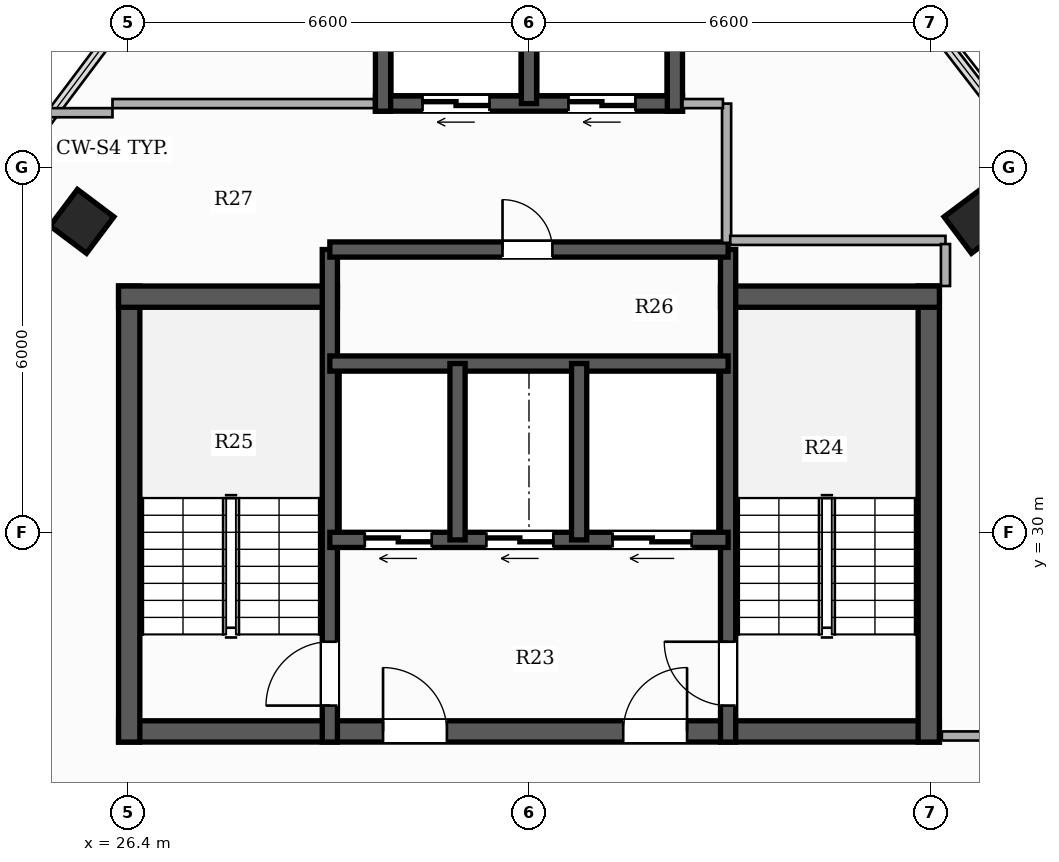
"""IFC4 building model, lengths in metres.
Left out: names, types, materials, properties, quantities, classifications, styles, units other than length and angle.
Written with IfcOpenShell. Run it as: python <this file> out.ifc"""

import sys

from ifc_helpers import new_model, si_unit, direction, frame, frame_2d, origin, origin_2d, place, context, subcontext, project, spatial, rectangle, hollow_rectangle, extrude, element, fill, save


model = new_model("IFC4")
c1 = context("Model", 3, precision=1e-05, world=origin(), true_north=direction((0.0, 1.0)))
c2 = subcontext(c1, "Body", "Model", "MODEL_VIEW")
j1 = project(units=[si_unit("LENGTHUNIT", "METRE"), si_unit("PLANEANGLEUNIT", "RADIAN")], contexts=[c1])
p1 = place(None, origin())
s1 = spatial("IfcSite", under=j1, at=p1, CompositionType="ELEMENT")
p2 = place(p1, origin())
s2 = spatial("IfcBuilding", under=s1, at=p2, CompositionType="ELEMENT")
p3 = place(p2, frame((0.0, 0.0, 250.25)))
s3 = spatial("IfcBuildingStorey", under=s2, at=p3, CompositionType="ELEMENT", Elevation=250.25)
p4 = place(p3, frame((26.25, 26.725, 0.0), z_axis=(0.0, 0.0, 1.0), x_axis=(1.0, 0.0, 0.0)))
e1 = element("IfcWall", 1, at=p4, inside=s3, PredefinedType="SHEAR", context=c2, shape_type="SweptSolid", body=[
    extrude(rectangle(XDim=13.5, YDim=0.35, at=frame_2d((6.75, 0.0))), origin(), (0.0, 0.0, 1.0), 3.3),
])
p5 = place(p4, frame((4.35, 0.0, 0.0)))
e2 = element("IfcOpeningElement", 2, at=p5, cuts=e1, PredefinedType="OPENING", context=c2, shape_type="SweptSolid", body=[
    extrude(rectangle(XDim=1.05, YDim=2.15, at=frame_2d((0.525, 1.075))), frame((0.0, 0.185, 0.0), z_axis=(0.0, -1.0, 0.0), x_axis=(1.0, 0.0, 0.0)), (0.0, 0.0, 1.0), 0.37),
])
p6 = place(p4, frame((8.3, 0.0, 0.0)))
e3 = element("IfcOpeningElement", 3, at=p6, cuts=e1, PredefinedType="OPENING", context=c2, shape_type="SweptSolid", body=[
    extrude(rectangle(XDim=1.05, YDim=2.15, at=frame_2d((0.525, 1.075))), frame((0.0, 0.185, 0.0), z_axis=(0.0, -1.0, 0.0), x_axis=(1.0, 0.0, 0.0)), (0.0, 0.0, 1.0), 0.37),
])
p7 = place(p3, frame((26.425, 26.55, 0.0), z_axis=(0.0, 0.0, 1.0), x_axis=(0.0, 1.0, 0.0)))
e4 = element("IfcWall", 4, at=p7, inside=s3, PredefinedType="SHEAR", context=c2, shape_type="SweptSolid", body=[
    extrude(rectangle(XDim=7.5, YDim=0.35, at=frame_2d((3.75, 0.0))), origin(), (0.0, 0.0, 1.0), 3.3),
])
p8 = place(p3, frame((26.25, 33.875, 0.0), z_axis=(0.0, 0.0, 1.0), x_axis=(1.0, 0.0, 0.0)))
e5 = element("IfcWall", 5, at=p8, inside=s3, PredefinedType="SHEAR", context=c2, shape_type="SweptSolid", body=[
    extrude(rectangle(XDim=3.6, YDim=0.35, at=frame_2d((1.8, 0.0))), origin(), (0.0, 0.0, 1.0), 3.3),
])
p9 = place(p3, frame((39.575, 26.55, 0.0), z_axis=(0.0, 0.0, 1.0), x_axis=(0.0, 1.0, 0.0)))
e6 = element("IfcWall", 6, at=p9, inside=s3, PredefinedType="SHEAR", context=c2, shape_type="SweptSolid", body=[
    extrude(rectangle(XDim=7.5, YDim=0.35, at=frame_2d((3.75, 0.0))), origin(), (0.0, 0.0, 1.0), 3.3),
])
p10 = place(p3, frame((36.15, 33.875, 0.0), z_axis=(0.0, 0.0, 1.0), x_axis=(1.0, 0.0, 0.0)))
e7 = element("IfcWall", 7, at=p10, inside=s3, PredefinedType="SHEAR", context=c2, shape_type="SweptSolid", body=[
    extrude(rectangle(XDim=3.6, YDim=0.35, at=frame_2d((1.8, 0.0))), origin(), (0.0, 0.0, 1.0), 3.3),
])
p11 = place(p3, frame((29.725, 26.55, 0.0), z_axis=(0.0, 0.0, 1.0), x_axis=(0.0, 1.0, 0.0)))
e8 = element("IfcWall", 8, at=p11, inside=s3, PredefinedType="SHEAR", context=c2, shape_type="SweptSolid", body=[
    extrude(rectangle(XDim=8.1, YDim=0.25, at=frame_2d((4.05, 0.0))), origin(), (0.0, 0.0, 1.0), 3.3),
])
p12 = place(p11, frame((0.6, 0.0, 0.0)))
e9 = element("IfcOpeningElement", 9, at=p12, cuts=e8, PredefinedType="OPENING", context=c2, shape_type="SweptSolid", body=[
    extrude(rectangle(XDim=1.05, YDim=2.15, at=frame_2d((0.525, 1.075))), frame((0.0, 0.135, 0.0), z_axis=(0.0, -1.0, 0.0), x_axis=(1.0, 0.0, 0.0)), (0.0, 0.0, 1.0), 0.27),
])
p13 = place(p3, frame((36.275, 26.55, 0.0), z_axis=(0.0, 0.0, 1.0), x_axis=(0.0, 1.0, 0.0)))
e10 = element("IfcWall", 10, at=p13, inside=s3, PredefinedType="SHEAR", context=c2, shape_type="SweptSolid", body=[
    extrude(rectangle(XDim=8.1, YDim=0.25, at=frame_2d((4.05, 0.0))), origin(), (0.0, 0.0, 1.0), 3.3),
])
p14 = place(p13, frame((0.6, 0.0, 0.0)))
e11 = element("IfcOpeningElement", 11, at=p14, cuts=e10, PredefinedType="OPENING", context=c2, shape_type="SweptSolid", body=[
    extrude(rectangle(XDim=1.05, YDim=2.15, at=frame_2d((0.525, 1.075))), frame((0.0, 0.135, 0.0), z_axis=(0.0, -1.0, 0.0), x_axis=(1.0, 0.0, 0.0)), (0.0, 0.0, 1.0), 0.27),
])
p15 = place(p3, frame((36.275, 29.875, 0.0), z_axis=(0.0, 0.0, 1.0), x_axis=(-1.0, 0.0, 0.0)))
e12 = element("IfcWall", 12, at=p15, inside=s3, PredefinedType="SHEAR", context=c2, shape_type="SweptSolid", body=[
    extrude(rectangle(XDim=6.55, YDim=0.25, at=frame_2d((3.275, 0.0))), origin(), (0.0, 0.0, 1.0), 3.3),
])
p16 = place(p15, frame((4.875, 0.0, 0.0)))
e13 = element("IfcOpeningElement", 13, at=p16, cuts=e12, PredefinedType="OPENING", context=c2, shape_type="SweptSolid", body=[
    extrude(rectangle(XDim=1.1, YDim=2.2, at=frame_2d((0.55, 1.1))), frame((0.0, 0.135, 0.0), z_axis=(0.0, -1.0, 0.0), x_axis=(1.0, 0.0, 0.0)), (0.0, 0.0, 1.0), 0.27),
])
p17 = place(p15, frame((2.875, 0.0, 0.0)))
e14 = element("IfcOpeningElement", 14, at=p17, cuts=e12, PredefinedType="OPENING", context=c2, shape_type="SweptSolid", body=[
    extrude(rectangle(XDim=1.1, YDim=2.2, at=frame_2d((0.55, 1.1))), frame((0.0, 0.135, 0.0), z_axis=(0.0, -1.0, 0.0), x_axis=(1.0, 0.0, 0.0)), (0.0, 0.0, 1.0), 0.27),
])
p18 = place(p15, frame((0.6, 0.0, 0.0)))
e15 = element("IfcOpeningElement", 15, at=p18, cuts=e12, PredefinedType="OPENING", context=c2, shape_type="SweptSolid", body=[
    extrude(rectangle(XDim=1.3, YDim=2.2, at=frame_2d((0.65, 1.1))), frame((0.0, 0.135, 0.0), z_axis=(0.0, -1.0, 0.0), x_axis=(1.0, 0.0, 0.0)), (0.0, 0.0, 1.0), 0.27),
])
p19 = place(p3, frame((29.725, 32.775, 0.0), z_axis=(0.0, 0.0, 1.0), x_axis=(1.0, 0.0, 0.0)))
e16 = element("IfcWall", 16, at=p19, inside=s3, PredefinedType="SHEAR", context=c2, shape_type="SweptSolid", body=[
    extrude(rectangle(XDim=6.55, YDim=0.25, at=frame_2d((3.275, 0.0))), origin(), (0.0, 0.0, 1.0), 3.3),
])
for number, where, z_axis, x_axis in (
    (17, (31.825, 29.875, 0.0), (0.0, 0.0, 1.0), (0.0, 1.0, 0.0)),
    (18, (33.825, 29.875, 0.0), (0.0, 0.0, 1.0), (0.0, 1.0, 0.0)),
):
    element("IfcWall", number, at=place(p3, frame(where, z_axis=z_axis, x_axis=x_axis)), inside=s3, PredefinedType="SHEAR", context=c2, shape_type="SweptSolid", body=[
        extrude(rectangle(XDim=2.9, YDim=0.25, at=frame_2d((1.45, 0.0))), origin(), (0.0, 0.0, 1.0), 3.3),
    ])
p20 = place(p3, frame((29.725, 34.65, 0.0), z_axis=(0.0, 0.0, 1.0), x_axis=(1.0, 0.0, 0.0)))
e19 = element("IfcWall", 19, at=p20, inside=s3, PredefinedType="SHEAR", context=c2, shape_type="SweptSolid", body=[
    extrude(rectangle(XDim=6.55, YDim=0.25, at=frame_2d((3.275, 0.0))), origin(), (0.0, 0.0, 1.0), 3.3),
])
p21 = place(p20, frame((2.84, 0.0, 0.0)))
e20 = element("IfcOpeningElement", 20, at=p21, cuts=e19, PredefinedType="OPENING", context=c2, shape_type="SweptSolid", body=[
    extrude(rectangle(XDim=0.82, YDim=2.1, at=frame_2d((0.41, 1.05))), frame((0.0, 0.135, 0.0), z_axis=(0.0, -1.0, 0.0), x_axis=(1.0, 0.0, 0.0)), (0.0, 0.0, 1.0), 0.27),
])
p22 = place(p3, frame((35.525, 37.05, 0.0), z_axis=(0.0, 0.0, 1.0), x_axis=(-1.0, 0.0, 0.0)))
e21 = element("IfcWall", 21, at=p22, inside=s3, PredefinedType="SHEAR", context=c2, shape_type="SweptSolid", body=[
    extrude(rectangle(XDim=5.05, YDim=0.25, at=frame_2d((2.525, 0.0))), origin(), (0.0, 0.0, 1.0), 3.3),
])
p23 = place(p22, frame((3.175, 0.0, 0.0)))
e22 = element("IfcOpeningElement", 22, at=p23, cuts=e21, PredefinedType="OPENING", context=c2, shape_type="SweptSolid", body=[
    extrude(rectangle(XDim=1.1, YDim=2.2, at=frame_2d((0.55, 1.1))), frame((0.0, 0.135, 0.0), z_axis=(0.0, -1.0, 0.0), x_axis=(1.0, 0.0, 0.0)), (0.0, 0.0, 1.0), 0.27),
])
p24 = place(p22, frame((0.775, 0.0, 0.0)))
e23 = element("IfcOpeningElement", 23, at=p24, cuts=e21, PredefinedType="OPENING", context=c2, shape_type="SweptSolid", body=[
    extrude(rectangle(XDim=1.1, YDim=2.2, at=frame_2d((0.55, 1.1))), frame((0.0, 0.135, 0.0), z_axis=(0.0, -1.0, 0.0), x_axis=(1.0, 0.0, 0.0)), (0.0, 0.0, 1.0), 0.27),
])
for number, where, z_axis, x_axis in (
    (24, (30.6, 36.925, 0.0), (0.0, 0.0, 1.0), (0.0, 1.0, 0.0)),
    (25, (35.4, 36.925, 0.0), (0.0, 0.0, 1.0), (0.0, 1.0, 0.0)),
):
    element("IfcWall", number, at=place(p3, frame(where, z_axis=z_axis, x_axis=x_axis)), inside=s3, PredefinedType="SHEAR", context=c2, shape_type="SweptSolid", body=[
        extrude(rectangle(XDim=2.8, YDim=0.25, at=frame_2d((1.4, 0.0))), origin(), (0.0, 0.0, 1.0), 3.3),
    ])
p25 = place(p3, frame((33.0, 37.05, 0.0), z_axis=(0.0, 0.0, 1.0), x_axis=(0.0, 1.0, 0.0)))
e26 = element("IfcWall", 26, at=p25, inside=s3, PredefinedType="SHEAR", context=c2, shape_type="SweptSolid", body=[
    extrude(rectangle(XDim=2.55, YDim=0.25, at=frame_2d((1.275, 0.0))), origin(), (0.0, 0.0, 1.0), 3.3),
])
for number, where, z_axis, x_axis in (
    (27, (25.648, 35.113, 0.0), (0.0, 0.0, 1.0), (0.6, 0.8, 0.0)),
    (28, (40.352, 35.113, 0.0), (0.0, 0.0, 1.0), (-0.6, 0.8, 0.0)),
):
    element("IfcColumn", number, at=place(p3, frame(where, z_axis=z_axis, x_axis=x_axis)), inside=s3, PredefinedType="COLUMN", context=c2, shape_type="SweptSolid", body=[
        extrude(hollow_rectangle(XDim=0.75, YDim=0.75, WallThickness=0.025, at=origin_2d()), origin(), (0.0, 0.0, 1.0), 3.3),
    ])
p26 = place(p3, frame((36.25, 34.76, 0.0), z_axis=(0.0, 0.0, 1.0), x_axis=(0.0, 1.0, 0.0)))
e29 = element("IfcWall", 29, at=p26, inside=s3, PredefinedType="PARTITIONING", context=c2, shape_type="SweptSolid", body=[
    extrude(rectangle(XDim=2.29, YDim=0.15, at=frame_2d((1.145, 0.0))), origin(), (0.0, 0.0, 1.0), 2.425),
])
p27 = place(p3, frame((35.525, 37.05, 0.0), z_axis=(0.0, 0.0, 1.0), x_axis=(1.0, 0.0, 0.0)))
e30 = element("IfcWall", 30, at=p27, inside=s3, PredefinedType="PARTITIONING", context=c2, shape_type="SweptSolid", body=[
    extrude(rectangle(XDim=0.665, YDim=0.15, at=frame_2d((0.333, 0.0))), origin(), (0.0, 0.0, 1.0), 2.425),
])
p28 = place(p3, frame((25.058, 36.9, 0.0), z_axis=(0.0, 0.0, 1.0), x_axis=(1.0, 0.0, 0.0)))
e31 = element("IfcWall", 31, at=p28, inside=s3, PredefinedType="PARTITIONING", context=c2, shape_type="SweptSolid", body=[
    extrude(rectangle(XDim=1.092, YDim=0.15, at=frame_2d((0.546, 0.0))), origin(), (0.0, 0.0, 1.0), 3.06),
])
p29 = place(p3, frame((39.79, 26.65, 0.0), z_axis=(0.0, 0.0, 1.0), x_axis=(1.0, 0.0, 0.0)))
e32 = element("IfcWall", 32, at=p29, inside=s3, PredefinedType="PARTITIONING", context=c2, shape_type="SweptSolid", body=[
    extrude(rectangle(XDim=2.46, YDim=0.15, at=frame_2d((1.23, 0.0))), origin(), (0.0, 0.0, 1.0), 2.565),
])
p30 = place(p3, frame((26.15, 37.05, 0.0), z_axis=(0.0, 0.0, 1.0), x_axis=(1.0, 0.0, 0.0)))
e33 = element("IfcWall", 33, at=p30, inside=s3, PredefinedType="PARTITIONING", context=c2, shape_type="SweptSolid", body=[
    extrude(rectangle(XDim=4.3, YDim=0.15, at=frame_2d((2.15, 0.0))), origin(), (0.0, 0.0, 1.0), 2.425),
])
p31 = place(p3, frame((36.31, 34.8, 0.0), z_axis=(0.0, 0.0, 1.0), x_axis=(1.0, 0.0, 0.0)))
e34 = element("IfcWall", 34, at=p31, inside=s3, PredefinedType="PARTITIONING", context=c2, shape_type="SweptSolid", body=[
    extrude(rectangle(XDim=3.54, YDim=0.15, at=frame_2d((1.77, 0.0))), origin(), (0.0, 0.0, 1.0), 2.425),
])
p32 = place(p3, frame((39.85, 34.74, 0.0), z_axis=(0.0, 0.0, 1.0), x_axis=(0.0, -1.0, 0.0)))
e35 = element("IfcWall", 35, at=p32, inside=s3, PredefinedType="PARTITIONING", context=c2, shape_type="SweptSolid", body=[
    extrude(rectangle(XDim=0.69, YDim=0.15, at=frame_2d((0.345, 0.0))), origin(), (0.0, 0.0, 1.0), 2.773),
])
p33 = place(p12, origin())
e36 = element("IfcDoor", 36, at=p33, inside=s3, OperationType="SINGLE_SWING_LEFT", PredefinedType="DOOR", context=c2, shape_type="SweptSolid", body=[
    extrude(rectangle(XDim=1.05, YDim=2.15, at=frame_2d((0.525, 1.075))), frame((0.0, 0.025, 0.0), z_axis=(0.0, -1.0, 0.0), x_axis=(1.0, 0.0, 0.0)), (0.0, 0.0, 1.0), 0.05),
])
fill(e9, e36)
p34 = place(p14, origin())
e37 = element("IfcDoor", 37, at=p34, inside=s3, OperationType="SINGLE_SWING_RIGHT", PredefinedType="DOOR", context=c2, shape_type="SweptSolid", body=[
    extrude(rectangle(XDim=1.05, YDim=2.15, at=frame_2d((0.525, 1.075))), frame((0.0, 0.025, 0.0), z_axis=(0.0, -1.0, 0.0), x_axis=(1.0, 0.0, 0.0)), (0.0, 0.0, 1.0), 0.05),
])
fill(e11, e37)
p35 = place(p5, origin())
e38 = element("IfcDoor", 38, at=p35, inside=s3, OperationType="SINGLE_SWING_LEFT", PredefinedType="DOOR", context=c2, shape_type="SweptSolid", body=[
    extrude(rectangle(XDim=1.05, YDim=2.15, at=frame_2d((0.525, 1.075))), frame((0.0, 0.025, 0.0), z_axis=(0.0, -1.0, 0.0), x_axis=(1.0, 0.0, 0.0)), (0.0, 0.0, 1.0), 0.05),
])
fill(e2, e38)
p36 = place(p6, origin())
e39 = element("IfcDoor", 39, at=p36, inside=s3, OperationType="SINGLE_SWING_RIGHT", PredefinedType="DOOR", context=c2, shape_type="SweptSolid", body=[
    extrude(rectangle(XDim=1.05, YDim=2.15, at=frame_2d((0.525, 1.075))), frame((0.0, 0.025, 0.0), z_axis=(0.0, -1.0, 0.0), x_axis=(1.0, 0.0, 0.0)), (0.0, 0.0, 1.0), 0.05),
])
fill(e3, e39)
p37 = place(p16, origin())
e40 = element("IfcDoor", 40, at=p37, inside=s3, OperationType="DOUBLE_DOOR_SLIDING", PredefinedType="DOOR", context=c2, shape_type="SweptSolid", body=[
    extrude(rectangle(XDim=1.1, YDim=2.2, at=frame_2d((0.55, 1.1))), frame((0.0, 0.025, 0.0), z_axis=(0.0, -1.0, 0.0), x_axis=(1.0, 0.0, 0.0)), (0.0, 0.0, 1.0), 0.05),
])
fill(e13, e40)
p38 = place(p17, origin())
e41 = element("IfcDoor", 41, at=p38, inside=s3, OperationType="DOUBLE_DOOR_SLIDING", PredefinedType="DOOR", context=c2, shape_type="SweptSolid", body=[
    extrude(rectangle(XDim=1.1, YDim=2.2, at=frame_2d((0.55, 1.1))), frame((0.0, 0.025, 0.0), z_axis=(0.0, -1.0, 0.0), x_axis=(1.0, 0.0, 0.0)), (0.0, 0.0, 1.0), 0.05),
])
fill(e14, e41)
p39 = place(p18, origin())
e42 = element("IfcDoor", 42, at=p39, inside=s3, OperationType="DOUBLE_DOOR_SLIDING", PredefinedType="DOOR", context=c2, shape_type="SweptSolid", body=[
    extrude(rectangle(XDim=1.3, YDim=2.2, at=frame_2d((0.65, 1.1))), frame((0.0, 0.025, 0.0), z_axis=(0.0, -1.0, 0.0), x_axis=(1.0, 0.0, 0.0)), (0.0, 0.0, 1.0), 0.05),
])
fill(e15, e42)
p40 = place(p23, origin())
e43 = element("IfcDoor", 43, at=p40, inside=s3, OperationType="DOUBLE_DOOR_SLIDING", PredefinedType="DOOR", context=c2, shape_type="SweptSolid", body=[
    extrude(rectangle(XDim=1.1, YDim=2.2, at=frame_2d((0.55, 1.1))), frame((0.0, 0.025, 0.0), z_axis=(0.0, -1.0, 0.0), x_axis=(1.0, 0.0, 0.0)), (0.0, 0.0, 1.0), 0.05),
])
fill(e22, e43)
p41 = place(p24, origin())
e44 = element("IfcDoor", 44, at=p41, inside=s3, OperationType="DOUBLE_DOOR_SLIDING", PredefinedType="DOOR", context=c2, shape_type="SweptSolid", body=[
    extrude(rectangle(XDim=1.1, YDim=2.2, at=frame_2d((0.55, 1.1))), frame((0.0, 0.025, 0.0), z_axis=(0.0, -1.0, 0.0), x_axis=(1.0, 0.0, 0.0)), (0.0, 0.0, 1.0), 0.05),
])
fill(e23, e44)
p42 = place(p21, origin())
e45 = element("IfcDoor", 45, at=p42, inside=s3, OperationType="SINGLE_SWING_LEFT", PredefinedType="DOOR", context=c2, shape_type="SweptSolid", body=[
    extrude(rectangle(XDim=0.82, YDim=2.1, at=frame_2d((0.41, 1.05))), frame((0.0, 0.025, 0.0), z_axis=(0.0, -1.0, 0.0), x_axis=(1.0, 0.0, 0.0)), (0.0, 0.0, 1.0), 0.05),
])
fill(e20, e45)
save(model, sys.argv[1])
